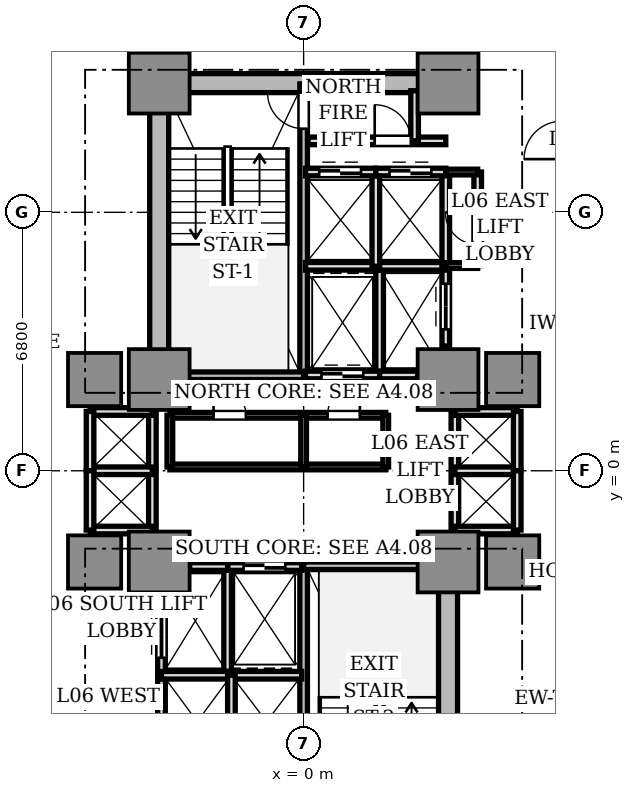
"""IFC4 building model, lengths in metres.
Left out: names, types, materials, properties, quantities, classifications, styles, units other than length and angle.
Written with IfcOpenShell. Run it as: python <this file> out.ifc"""

import sys

from ifc_helpers import new_model, si_unit, direction, frame, frame_2d, origin, origin_2d, place, context, subcontext, project, spatial, rectangle, extrude, source, transform, mapped, element, fill, save


model = new_model("IFC4")
c1 = context("Model", 3, precision=1e-05, world=origin(), true_north=direction((0.0, 1.0)))
c2 = subcontext(c1, "Body", "Model", "MODEL_VIEW")
j1 = project(units=[si_unit("LENGTHUNIT", "METRE"), si_unit("PLANEANGLEUNIT", "RADIAN")], contexts=[c1])
p1 = place(None, origin())
s1 = spatial("IfcSite", under=j1, at=p1, CompositionType="ELEMENT")
p2 = place(p1, origin())
s2 = spatial("IfcBuilding", under=s1, at=p2, CompositionType="ELEMENT")
p3 = place(p2, frame((0.0, 0.0, 26.45)))
s3 = spatial("IfcBuildingStorey", under=s2, at=p3, CompositionType="ELEMENT", Elevation=26.45)
p4 = place(p3, frame((-3.55, 10.2, 0.0), z_axis=(0.0, 0.0, 1.0), x_axis=(1.0, 0.0, 0.0)))
e1 = element("IfcWall", 1, at=p4, inside=s3, PredefinedType="SHEAR", context=c2, shape_type="SweptSolid", body=[
    extrude(rectangle(XDim=7.1, YDim=0.5, at=frame_2d((3.55, 0.0))), origin(), (0.0, 0.0, 1.0), 3.11),
])
for number, where, z_axis, x_axis in (
    (2, (-3.8, 2.85, 0.0), (0.0, 0.0, 1.0), (0.0, 1.0, 0.0)),
    (3, (3.8, -9.75, 0.0), (0.0, 0.0, 1.0), (0.0, 1.0, 0.0)),
):
    element("IfcWall", number, at=place(p3, frame(where, z_axis=z_axis, x_axis=x_axis)), inside=s3, PredefinedType="SHEAR", context=c2, shape_type="SweptSolid", body=[
        extrude(rectangle(XDim=6.9, YDim=0.5, at=frame_2d((3.45, 0.0))), origin(), (0.0, 0.0, 1.0), 3.11),
    ])
m1 = source(origin(), c2, "Body", "SweptSolid", [
    extrude(rectangle(XDim=1.6, YDim=1.6, at=origin_2d()), origin(), (0.0, 0.0, 1.0), 3.11),
])
for number, where, z_axis, x_axis in (
    (4, (-3.8, 2.4, 0.0), (0.0, 0.0, 1.0), (1.0, 0.0, 0.0)),
    (5, (3.8, 2.4, 0.0), (0.0, 0.0, 1.0), (1.0, 0.0, 0.0)),
    (6, (-3.8, 10.2, 0.0), (0.0, 0.0, 1.0), (1.0, 0.0, 0.0)),
    (7, (3.8, 10.2, 0.0), (0.0, 0.0, 1.0), (1.0, 0.0, 0.0)),
    (8, (-3.8, -2.4, 0.0), (0.0, 0.0, 1.0), (1.0, 0.0, 0.0)),
    (9, (3.8, -2.4, 0.0), (0.0, 0.0, 1.0), (1.0, 0.0, 0.0)),
):
    element("IfcColumn", number, at=place(p3, frame(where, z_axis=z_axis, x_axis=x_axis)), inside=s3, PredefinedType="COLUMN", context=c2, shape_type="MappedRepresentation", body=[
        mapped(m1, transform((0.0, 0.0, 0.0), scale=1.0)),
    ])
m2 = source(origin(), c2, "Body", "SweptSolid", [
    extrude(rectangle(XDim=1.4, YDim=1.4, at=origin_2d()), origin(), (0.0, 0.0, 1.0), 3.11),
])
for number, where, z_axis, x_axis in (
    (10, (5.5, 2.4, 0.0), (0.0, 0.0, 1.0), (1.0, 0.0, 0.0)),
    (11, (-5.5, 2.4, 0.0), (0.0, 0.0, 1.0), (1.0, 0.0, 0.0)),
    (12, (5.5, -2.4, 0.0), (0.0, 0.0, 1.0), (1.0, 0.0, 0.0)),
    (13, (-5.5, -2.4, 0.0), (0.0, 0.0, 1.0), (1.0, 0.0, 0.0)),
):
    element("IfcColumn", number, at=place(p3, frame(where, z_axis=z_axis, x_axis=x_axis)), inside=s3, PredefinedType="COLUMN", context=c2, shape_type="MappedRepresentation", body=[
        mapped(m2, transform((0.0, 0.0, 0.0), scale=1.0)),
    ])
p5 = place(p3, frame((0.0, 2.5, 0.0), z_axis=(0.0, 0.0, 1.0), x_axis=(0.0, 1.0, 0.0)))
e14 = element("IfcWall", 14, at=p5, inside=s3, PredefinedType="SOLIDWALL", context=c2, shape_type="SweptSolid", body=[
    extrude(rectangle(XDim=7.68, YDim=0.2, at=frame_2d((3.84, 0.0))), origin(), (0.0, 0.0, 1.0), 3.11),
])
p6 = place(p5, frame((6.5, 0.0, 0.0)))
e15 = element("IfcOpeningElement", 15, at=p6, cuts=e14, PredefinedType="OPENING", context=c2, shape_type="SweptSolid", body=[
    extrude(rectangle(XDim=0.95, YDim=2.15, at=frame_2d((0.475, 1.075))), frame((0.0, 0.11, 0.0), z_axis=(0.0, -1.0, 0.0), x_axis=(1.0, 0.0, 0.0)), (0.0, 0.0, 1.0), 0.22),
])
p7 = place(p3, frame((-3.72, 2.5, 0.0), z_axis=(0.0, 0.0, 1.0), x_axis=(1.0, 0.0, 0.0)))
e16 = element("IfcWall", 16, at=p7, inside=s3, PredefinedType="SOLIDWALL", context=c2, shape_type="SweptSolid", body=[
    extrude(rectangle(XDim=3.72, YDim=0.2, at=frame_2d((1.86, 0.0))), origin(), (0.0, 0.0, 1.0), 3.11),
])
p8 = place(p3, frame((0.0, -10.18, 0.0), z_axis=(0.0, 0.0, 1.0), x_axis=(0.0, 1.0, 0.0)))
e17 = element("IfcWall", 17, at=p8, inside=s3, PredefinedType="SOLIDWALL", context=c2, shape_type="SweptSolid", body=[
    extrude(rectangle(XDim=7.68, YDim=0.2, at=frame_2d((3.84, 0.0))), origin(), (0.0, 0.0, 1.0), 3.11),
])
p9 = place(p8, frame((0.28, 0.0, 0.0)))
e18 = element("IfcOpeningElement", 18, at=p9, cuts=e17, PredefinedType="OPENING", context=c2, shape_type="SweptSolid", body=[
    extrude(rectangle(XDim=1.1, YDim=2.15, at=frame_2d((0.55, 1.075))), frame((0.0, 0.11, 0.0), z_axis=(0.0, -1.0, 0.0), x_axis=(1.0, 0.0, 0.0)), (0.0, 0.0, 1.0), 0.22),
])
p10 = place(p3, frame((0.0, -2.5, 0.0), z_axis=(0.0, 0.0, 1.0), x_axis=(1.0, 0.0, 0.0)))
e19 = element("IfcWall", 19, at=p10, inside=s3, PredefinedType="SOLIDWALL", context=c2, shape_type="SweptSolid", body=[
    extrude(rectangle(XDim=3.72, YDim=0.2, at=frame_2d((1.86, 0.0))), origin(), (0.0, 0.0, 1.0), 3.11),
])
p11 = place(p3, frame((2.0, 2.5, 0.0), z_axis=(0.0, 0.0, 1.0), x_axis=(0.0, 1.0, 0.0)))
e20 = element("IfcWall", 20, at=p11, inside=s3, PredefinedType="SOLIDWALL", context=c2, shape_type="SweptSolid", body=[
    extrude(rectangle(XDim=2.78, YDim=0.2, at=frame_2d((1.39, 0.0))), origin(), (0.0, 0.0, 1.0), 2.66),
])
p12 = place(p3, frame((0.05, 2.52, 0.0), z_axis=(0.0, 0.0, 1.0), x_axis=(1.0, 0.0, 0.0)))
e21 = element("IfcWall", 21, at=p12, inside=s3, PredefinedType="SOLIDWALL", context=c2, shape_type="SweptSolid", body=[
    extrude(rectangle(XDim=1.95, YDim=0.2, at=frame_2d((0.975, 0.0))), origin(), (0.0, 0.0, 1.0), 2.66),
])
p13 = place(p12, frame((0.42, 0.0, 0.0)))
e22 = element("IfcOpeningElement", 22, at=p13, cuts=e21, PredefinedType="OPENING", context=c2, shape_type="SweptSolid", body=[
    extrude(rectangle(XDim=1.1, YDim=2.2, at=frame_2d((0.55, 1.1))), frame((0.0, 0.11, 0.0), z_axis=(0.0, -1.0, 0.0), x_axis=(1.0, 0.0, 0.0)), (0.0, 0.0, 1.0), 0.22),
])
p14 = place(p3, frame((-2.0, -5.28, 0.0), z_axis=(0.0, 0.0, 1.0), x_axis=(0.0, 1.0, 0.0)))
e23 = element("IfcWall", 23, at=p14, inside=s3, PredefinedType="SOLIDWALL", context=c2, shape_type="SweptSolid", body=[
    extrude(rectangle(XDim=2.78, YDim=0.2, at=frame_2d((1.39, 0.0))), origin(), (0.0, 0.0, 1.0), 2.66),
])
p15 = place(p3, frame((-2.0, -2.52, 0.0), z_axis=(0.0, 0.0, 1.0), x_axis=(1.0, 0.0, 0.0)))
e24 = element("IfcWall", 24, at=p15, inside=s3, PredefinedType="SOLIDWALL", context=c2, shape_type="SweptSolid", body=[
    extrude(rectangle(XDim=1.95, YDim=0.2, at=frame_2d((0.975, 0.0))), origin(), (0.0, 0.0, 1.0), 2.66),
])
p16 = place(p15, frame((0.42, 0.0, 0.0)))
e25 = element("IfcOpeningElement", 25, at=p16, cuts=e24, PredefinedType="OPENING", context=c2, shape_type="SweptSolid", body=[
    extrude(rectangle(XDim=1.1, YDim=2.2, at=frame_2d((0.55, 1.1))), frame((0.0, 0.11, 0.0), z_axis=(0.0, -1.0, 0.0), x_axis=(1.0, 0.0, 0.0)), (0.0, 0.0, 1.0), 0.22),
])
p17 = place(p3, frame((2.0, 2.52, 0.0), z_axis=(0.0, 0.0, 1.0), x_axis=(1.0, 0.0, 0.0)))
e26 = element("IfcWall", 26, at=p17, inside=s3, PredefinedType="SOLIDWALL", context=c2, shape_type="SweptSolid", body=[
    extrude(rectangle(XDim=1.0, YDim=0.2, at=frame_2d((0.5, 0.0))), origin(), (0.0, 0.0, 1.0), 2.66),
])
p18 = place(p3, frame((3.74, 3.28, 0.0), z_axis=(0.0, 0.0, 1.0), x_axis=(0.0, 1.0, 0.0)))
e27 = element("IfcWall", 27, at=p18, inside=s3, PredefinedType="SOLIDWALL", context=c2, shape_type="SweptSolid", body=[
    extrude(rectangle(XDim=2.08, YDim=0.2, at=frame_2d((1.04, 0.0))), origin(), (0.0, 0.0, 1.0), 2.66),
])
p19 = place(p18, frame((0.44, 0.0, 0.0)))
e28 = element("IfcOpeningElement", 28, at=p19, cuts=e27, PredefinedType="OPENING", context=c2, shape_type="SweptSolid", body=[
    extrude(rectangle(XDim=1.2, YDim=2.2, at=frame_2d((0.6, 1.1))), frame((0.0, 0.11, 0.0), z_axis=(0.0, -1.0, 0.0), x_axis=(1.0, 0.0, 0.0)), (0.0, 0.0, 1.0), 0.22),
])
p20 = place(p3, frame((-3.0, -2.52, 0.0), z_axis=(0.0, 0.0, 1.0), x_axis=(1.0, 0.0, 0.0)))
e29 = element("IfcWall", 29, at=p20, inside=s3, PredefinedType="SOLIDWALL", context=c2, shape_type="SweptSolid", body=[
    extrude(rectangle(XDim=1.0, YDim=0.2, at=frame_2d((0.5, 0.0))), origin(), (0.0, 0.0, 1.0), 2.66),
])
p21 = place(p3, frame((-3.74, -5.36, 0.0), z_axis=(0.0, 0.0, 1.0), x_axis=(0.0, 1.0, 0.0)))
e30 = element("IfcWall", 30, at=p21, inside=s3, PredefinedType="SOLIDWALL", context=c2, shape_type="SweptSolid", body=[
    extrude(rectangle(XDim=2.08, YDim=0.2, at=frame_2d((1.04, 0.0))), origin(), (0.0, 0.0, 1.0), 2.66),
])
p22 = place(p21, frame((0.44, 0.0, 0.0)))
e31 = element("IfcOpeningElement", 31, at=p22, cuts=e30, PredefinedType="OPENING", context=c2, shape_type="SweptSolid", body=[
    extrude(rectangle(XDim=1.2, YDim=2.2, at=frame_2d((0.6, 1.1))), frame((0.0, 0.11, 0.0), z_axis=(0.0, -1.0, 0.0), x_axis=(1.0, 0.0, 0.0)), (0.0, 0.0, 1.0), 0.22),
])
p23 = place(p3, frame((0.05, 5.38, 0.0), z_axis=(0.0, 0.0, 1.0), x_axis=(1.0, 0.0, 0.0)))
e32 = element("IfcWall", 32, at=p23, inside=s3, PredefinedType="SOLIDWALL", context=c2, shape_type="SweptSolid", body=[
    extrude(rectangle(XDim=3.69, YDim=0.2, at=frame_2d((1.845, 0.0))), origin(), (0.0, 0.0, 1.0), 2.66),
])
p24 = place(p3, frame((1.9, 5.38, 0.0), z_axis=(0.0, 0.0, 1.0), x_axis=(0.0, 1.0, 0.0)))
e33 = element("IfcWall", 33, at=p24, inside=s3, PredefinedType="SOLIDWALL", context=c2, shape_type="SweptSolid", body=[
    extrude(rectangle(XDim=2.48, YDim=0.2, at=frame_2d((1.24, 0.0))), origin(), (0.0, 0.0, 1.0), 2.66),
])
p25 = place(p3, frame((0.05, 7.86, 0.0), z_axis=(0.0, 0.0, 1.0), x_axis=(1.0, 0.0, 0.0)))
e34 = element("IfcWall", 34, at=p25, inside=s3, PredefinedType="SOLIDWALL", context=c2, shape_type="SweptSolid", body=[
    extrude(rectangle(XDim=1.85, YDim=0.2, at=frame_2d((0.925, 0.0))), origin(), (0.0, 0.0, 1.0), 2.66),
])
p26 = place(p25, frame((0.36, 0.0, 0.0)))
e35 = element("IfcOpeningElement", 35, at=p26, cuts=e34, PredefinedType="OPENING", context=c2, shape_type="SweptSolid", body=[
    extrude(rectangle(XDim=1.1, YDim=2.2, at=frame_2d((0.55, 1.1))), frame((0.0, 0.11, 0.0), z_axis=(0.0, -1.0, 0.0), x_axis=(1.0, 0.0, 0.0)), (0.0, 0.0, 1.0), 0.22),
])
p27 = place(p3, frame((3.74, 5.38, 0.0), z_axis=(0.0, 0.0, 1.0), x_axis=(0.0, 1.0, 0.0)))
e36 = element("IfcWall", 36, at=p27, inside=s3, PredefinedType="SOLIDWALL", context=c2, shape_type="SweptSolid", body=[
    extrude(rectangle(XDim=2.48, YDim=0.2, at=frame_2d((1.24, 0.0))), origin(), (0.0, 0.0, 1.0), 2.66),
])
p28 = place(p3, frame((1.9, 7.86, 0.0), z_axis=(0.0, 0.0, 1.0), x_axis=(1.0, 0.0, 0.0)))
e37 = element("IfcWall", 37, at=p28, inside=s3, PredefinedType="SOLIDWALL", context=c2, shape_type="SweptSolid", body=[
    extrude(rectangle(XDim=1.84, YDim=0.2, at=frame_2d((0.92, 0.0))), origin(), (0.0, 0.0, 1.0), 2.66),
])
p29 = place(p28, frame((0.36, 0.0, 0.0)))
e38 = element("IfcOpeningElement", 38, at=p29, cuts=e37, PredefinedType="OPENING", context=c2, shape_type="SweptSolid", body=[
    extrude(rectangle(XDim=1.1, YDim=2.2, at=frame_2d((0.55, 1.1))), frame((0.0, 0.11, 0.0), z_axis=(0.0, -1.0, 0.0), x_axis=(1.0, 0.0, 0.0)), (0.0, 0.0, 1.0), 0.22),
])
p30 = place(p3, frame((-3.74, -7.86, 0.0), z_axis=(0.0, 0.0, 1.0), x_axis=(0.0, 1.0, 0.0)))
e39 = element("IfcWall", 39, at=p30, inside=s3, PredefinedType="SOLIDWALL", context=c2, shape_type="SweptSolid", body=[
    extrude(rectangle(XDim=2.48, YDim=0.2, at=frame_2d((1.24, 0.0))), origin(), (0.0, 0.0, 1.0), 2.66),
])
p31 = place(p3, frame((-3.74, -5.38, 0.0), z_axis=(0.0, 0.0, 1.0), x_axis=(1.0, 0.0, 0.0)))
e40 = element("IfcWall", 40, at=p31, inside=s3, PredefinedType="SOLIDWALL", context=c2, shape_type="SweptSolid", body=[
    extrude(rectangle(XDim=3.69, YDim=0.2, at=frame_2d((1.845, 0.0))), origin(), (0.0, 0.0, 1.0), 2.66),
])
p32 = place(p3, frame((-1.9, -7.86, 0.0), z_axis=(0.0, 0.0, 1.0), x_axis=(0.0, 1.0, 0.0)))
e41 = element("IfcWall", 41, at=p32, inside=s3, PredefinedType="SOLIDWALL", context=c2, shape_type="SweptSolid", body=[
    extrude(rectangle(XDim=2.48, YDim=0.2, at=frame_2d((1.24, 0.0))), origin(), (0.0, 0.0, 1.0), 2.66),
])
p33 = place(p3, frame((3.98, -1.56, 0.0), z_axis=(0.0, 0.0, 1.0), x_axis=(0.0, 1.0, 0.0)))
e42 = element("IfcWall", 42, at=p33, inside=s3, PredefinedType="SOLIDWALL", context=c2, shape_type="SweptSolid", body=[
    extrude(rectangle(XDim=3.12, YDim=0.2, at=frame_2d((1.56, 0.0))), origin(), (0.0, 0.0, 1.0), 2.18),
])
for number, where, z_axis, x_axis in (
    (43, (3.98, 1.56, 0.0), (0.0, 0.0, 1.0), (1.0, 0.0, 0.0)),
    (44, (3.98, -1.56, 0.0), (0.0, 0.0, 1.0), (1.0, 0.0, 0.0)),
    (45, (3.98, 0.0, 0.0), (0.0, 0.0, 1.0), (1.0, 0.0, 0.0)),
):
    element("IfcWall", number, at=place(p3, frame(where, z_axis=z_axis, x_axis=x_axis)), inside=s3, PredefinedType="SOLIDWALL", context=c2, shape_type="SweptSolid", body=[
        extrude(rectangle(XDim=1.64, YDim=0.2, at=frame_2d((0.82, 0.0))), origin(), (0.0, 0.0, 1.0), 2.66),
    ])
for number, where, z_axis, x_axis in (
    (46, (5.62, 0.0, 0.0), (0.0, 0.0, 1.0), (0.0, 1.0, 0.0)),
    (47, (5.62, -1.56, 0.0), (0.0, 0.0, 1.0), (0.0, 1.0, 0.0)),
):
    element("IfcWall", number, at=place(p3, frame(where, z_axis=z_axis, x_axis=x_axis)), inside=s3, PredefinedType="SOLIDWALL", context=c2, shape_type="SweptSolid", body=[
        extrude(rectangle(XDim=1.56, YDim=0.2, at=frame_2d((0.78, 0.0))), origin(), (0.0, 0.0, 1.0), 2.66),
    ])
p34 = place(p3, frame((-3.98, -1.56, 0.0), z_axis=(0.0, 0.0, 1.0), x_axis=(0.0, 1.0, 0.0)))
e48 = element("IfcWall", 48, at=p34, inside=s3, PredefinedType="SOLIDWALL", context=c2, shape_type="SweptSolid", body=[
    extrude(rectangle(XDim=3.12, YDim=0.2, at=frame_2d((1.56, 0.0))), origin(), (0.0, 0.0, 1.0), 2.18),
])
for number, where, z_axis, x_axis in (
    (49, (-5.62, 1.56, 0.0), (0.0, 0.0, 1.0), (1.0, 0.0, 0.0)),
    (50, (-5.62, -1.56, 0.0), (0.0, 0.0, 1.0), (1.0, 0.0, 0.0)),
    (51, (-5.62, 0.0, 0.0), (0.0, 0.0, 1.0), (1.0, 0.0, 0.0)),
):
    element("IfcWall", number, at=place(p3, frame(where, z_axis=z_axis, x_axis=x_axis)), inside=s3, PredefinedType="SOLIDWALL", context=c2, shape_type="SweptSolid", body=[
        extrude(rectangle(XDim=1.64, YDim=0.2, at=frame_2d((0.82, 0.0))), origin(), (0.0, 0.0, 1.0), 2.66),
    ])
for number, where, z_axis, x_axis in (
    (52, (-5.62, 0.0, 0.0), (0.0, 0.0, 1.0), (0.0, 1.0, 0.0)),
    (53, (-5.62, -1.56, 0.0), (0.0, 0.0, 1.0), (0.0, 1.0, 0.0)),
):
    element("IfcWall", number, at=place(p3, frame(where, z_axis=z_axis, x_axis=x_axis)), inside=s3, PredefinedType="SOLIDWALL", context=c2, shape_type="SweptSolid", body=[
        extrude(rectangle(XDim=1.56, YDim=0.2, at=frame_2d((0.78, 0.0))), origin(), (0.0, 0.0, 1.0), 2.66),
    ])
p35 = place(p3, frame((0.12, 8.68, 0.0), z_axis=(0.0, 0.0, 1.0), x_axis=(1.0, 0.0, 0.0)))
e54 = element("IfcWall", 54, at=p35, inside=s3, PredefinedType="SOLIDWALL", context=c2, shape_type="SweptSolid", body=[
    extrude(rectangle(XDim=3.62, YDim=0.2, at=frame_2d((1.81, 0.0))), origin(), (0.0, 0.0, 1.0), 2.66),
])
p36 = place(p35, frame((1.75, 0.0, 0.0)))
e55 = element("IfcOpeningElement", 55, at=p36, cuts=e54, PredefinedType="OPENING", context=c2, shape_type="SweptSolid", body=[
    extrude(rectangle(XDim=0.95, YDim=2.15, at=frame_2d((0.475, 1.075))), frame((0.0, 0.11, 0.0), z_axis=(0.0, -1.0, 0.0), x_axis=(1.0, 0.0, 0.0)), (0.0, 0.0, 1.0), 0.22),
])
p37 = place(p3, frame((2.92, 8.68, 0.0), z_axis=(0.0, 0.0, 1.0), x_axis=(0.0, 1.0, 0.0)))
e56 = element("IfcWall", 56, at=p37, inside=s3, PredefinedType="SOLIDWALL", context=c2, shape_type="SweptSolid", body=[
    extrude(rectangle(XDim=1.32, YDim=0.2, at=frame_2d((0.66, 0.0))), origin(), (0.0, 0.0, 1.0), 2.66),
])
p38 = place(p3, frame((4.58, 5.4, 0.0), z_axis=(0.0, 0.0, 1.0), x_axis=(0.0, 1.0, 0.0)))
e57 = element("IfcWall", 57, at=p38, inside=s3, PredefinedType="SOLIDWALL", context=c2, shape_type="SweptSolid", body=[
    extrude(rectangle(XDim=2.46, YDim=0.2, at=frame_2d((1.23, 0.0))), origin(), (0.0, 0.0, 1.0), 2.66),
])
p39 = place(p38, frame((0.55, 0.0, 0.0)))
e58 = element("IfcOpeningElement", 58, at=p39, cuts=e57, PredefinedType="OPENING", context=c2, shape_type="SweptSolid", body=[
    extrude(rectangle(XDim=0.85, YDim=2.1, at=frame_2d((0.425, 1.05))), frame((0.0, 0.11, 0.0), z_axis=(0.0, -1.0, 0.0), x_axis=(1.0, 0.0, 0.0)), (0.0, 0.0, 1.0), 0.22),
])
for number, where, z_axis, x_axis in (
    (59, (3.74, 5.4, 0.0), (0.0, 0.0, 1.0), (1.0, 0.0, 0.0)),
    (60, (3.74, 7.86, 0.0), (0.0, 0.0, 1.0), (1.0, 0.0, 0.0)),
):
    element("IfcWall", number, at=place(p3, frame(where, z_axis=z_axis, x_axis=x_axis)), inside=s3, PredefinedType="PARTITIONING", context=c2, shape_type="SweptSolid", body=[
        extrude(rectangle(XDim=0.84, YDim=0.15, at=frame_2d((0.42, 0.0))), origin(), (0.0, 0.0, 1.0), 2.66),
    ])
p40 = place(p3, frame((-3.52, 0.1, 0.0), z_axis=(0.0, 0.0, 1.0), x_axis=(1.0, 0.0, 0.0)))
e61 = element("IfcWall", 61, at=p40, inside=s3, PredefinedType="PARTITIONING", context=c2, shape_type="SweptSolid", body=[
    extrude(rectangle(XDim=5.68, YDim=0.15, at=frame_2d((2.84, 0.0))), origin(), (0.0, 0.0, 1.0), 2.66),
])
p41 = place(p3, frame((-3.52, 1.46, 0.0), z_axis=(0.0, 0.0, 1.0), x_axis=(1.0, 0.0, 0.0)))
e62 = element("IfcWall", 62, at=p41, inside=s3, PredefinedType="PARTITIONING", context=c2, shape_type="SweptSolid", body=[
    extrude(rectangle(XDim=5.68, YDim=0.15, at=frame_2d((2.84, 0.0))), origin(), (0.0, 0.0, 1.0), 2.66),
])
p42 = place(p41, frame((1.15, 0.0, 0.0)))
e63 = element("IfcOpeningElement", 63, at=p42, cuts=e62, PredefinedType="OPENING", context=c2, shape_type="SweptSolid", body=[
    extrude(rectangle(XDim=0.85, YDim=2.1, at=frame_2d((0.425, 1.05))), frame((0.0, 0.085, 0.0), z_axis=(0.0, -1.0, 0.0), x_axis=(1.0, 0.0, 0.0)), (0.0, 0.0, 1.0), 0.17),
])
p43 = place(p41, frame((4.15, 0.0, 0.0)))
e64 = element("IfcOpeningElement", 64, at=p43, cuts=e62, PredefinedType="OPENING", context=c2, shape_type="SweptSolid", body=[
    extrude(rectangle(XDim=0.85, YDim=2.1, at=frame_2d((0.425, 1.05))), frame((0.0, 0.085, 0.0), z_axis=(0.0, -1.0, 0.0), x_axis=(1.0, 0.0, 0.0)), (0.0, 0.0, 1.0), 0.17),
])
p44 = place(p3, frame((-3.52, 0.1, 0.0), z_axis=(0.0, 0.0, 1.0), x_axis=(0.0, 1.0, 0.0)))
e65 = element("IfcWall", 65, at=p44, inside=s3, PredefinedType="PARTITIONING", context=c2, shape_type="SweptSolid", body=[
    extrude(rectangle(XDim=1.36, YDim=0.15, at=frame_2d((0.68, 0.0))), origin(), (0.0, 0.0, 1.0), 2.18),
])
for number, where, z_axis, x_axis in (
    (66, (2.16, 0.1, 0.0), (0.0, 0.0, 1.0), (0.0, 1.0, 0.0)),
    (67, (0.0, 0.1, 0.0), (0.0, 0.0, 1.0), (0.0, 1.0, 0.0)),
):
    element("IfcWall", number, at=place(p3, frame(where, z_axis=z_axis, x_axis=x_axis)), inside=s3, PredefinedType="PARTITIONING", context=c2, shape_type="SweptSolid", body=[
        extrude(rectangle(XDim=1.36, YDim=0.15, at=frame_2d((0.68, 0.0))), origin(), (0.0, 0.0, 1.0), 2.66),
    ])
m3 = source(origin(), c2, "Body", "SweptSolid", [
    extrude(rectangle(XDim=1.1, YDim=0.05, at=origin_2d()), origin(), (0.0, 0.0, 1.0), 2.2),
])
p45 = place(p13, frame((0.55, 0.0, 0.0)))
e68 = element("IfcDoor", 68, at=p45, inside=s3, OperationType="DOUBLE_DOOR_SLIDING", PredefinedType="DOOR", context=c2, shape_type="MappedRepresentation", body=[
    mapped(m3, transform((0.0, 0.0, 0.0), scale=1.0)),
])
fill(e22, e68)
p46 = place(p16, frame((0.55, 0.0, 0.0)))
e69 = element("IfcDoor", 69, at=p46, inside=s3, OperationType="DOUBLE_DOOR_SLIDING", PredefinedType="DOOR", context=c2, shape_type="MappedRepresentation", body=[
    mapped(m3, transform((0.0, 0.0, 0.0), scale=1.0)),
])
fill(e25, e69)
m4 = source(origin(), c2, "Body", "SweptSolid", [
    extrude(rectangle(XDim=1.2, YDim=0.05, at=origin_2d()), origin(), (0.0, 0.0, 1.0), 2.2),
])
p47 = place(p19, frame((0.6, 0.0, 0.0)))
e70 = element("IfcDoor", 70, at=p47, inside=s3, OperationType="DOUBLE_DOOR_SLIDING", PredefinedType="DOOR", context=c2, shape_type="MappedRepresentation", body=[
    mapped(m4, transform((0.0, 0.0, 0.0), scale=1.0)),
])
fill(e28, e70)
p48 = place(p22, frame((0.6, 0.0, 0.0)))
e71 = element("IfcDoor", 71, at=p48, inside=s3, OperationType="DOUBLE_DOOR_SLIDING", PredefinedType="DOOR", context=c2, shape_type="MappedRepresentation", body=[
    mapped(m4, transform((0.0, 0.0, 0.0), scale=1.0)),
])
fill(e31, e71)
p49 = place(p26, frame((0.55, 0.0, 0.0)))
e72 = element("IfcDoor", 72, at=p49, inside=s3, OperationType="DOUBLE_DOOR_SLIDING", PredefinedType="DOOR", context=c2, shape_type="MappedRepresentation", body=[
    mapped(m3, transform((0.0, 0.0, 0.0), scale=1.0)),
])
fill(e35, e72)
p50 = place(p29, frame((0.55, 0.0, 0.0)))
e73 = element("IfcDoor", 73, at=p50, inside=s3, OperationType="DOUBLE_DOOR_SLIDING", PredefinedType="DOOR", context=c2, shape_type="MappedRepresentation", body=[
    mapped(m3, transform((0.0, 0.0, 0.0), scale=1.0)),
])
fill(e38, e73)
m5 = source(origin(), c2, "Body", "SweptSolid", [
    extrude(rectangle(XDim=0.95, YDim=0.05, at=origin_2d()), origin(), (0.0, 0.0, 1.0), 2.15),
])
p51 = place(p6, frame((0.475, 0.0, 0.0)))
e74 = element("IfcDoor", 74, at=p51, inside=s3, OperationType="SINGLE_SWING_RIGHT", PredefinedType="DOOR", context=c2, shape_type="MappedRepresentation", body=[
    mapped(m5, transform((0.0, 0.0, 0.0), scale=1.0)),
])
fill(e15, e74)
p52 = place(p36, frame((0.475, 0.0, 0.0)))
e75 = element("IfcDoor", 75, at=p52, inside=s3, OperationType="SINGLE_SWING_LEFT", PredefinedType="DOOR", context=c2, shape_type="MappedRepresentation", body=[
    mapped(m5, transform((0.0, 0.0, 0.0), scale=1.0)),
])
fill(e55, e75)
m6 = source(origin(), c2, "Body", "SweptSolid", [
    extrude(rectangle(XDim=0.85, YDim=0.05, at=origin_2d()), origin(), (0.0, 0.0, 1.0), 2.1),
])
p53 = place(p39, frame((0.425, 0.0, 0.0)))
e76 = element("IfcDoor", 76, at=p53, inside=s3, OperationType="SINGLE_SWING_RIGHT", PredefinedType="DOOR", context=c2, shape_type="MappedRepresentation", body=[
    mapped(m6, transform((0.0, 0.0, 0.0), scale=1.0)),
])
fill(e58, e76)
p54 = place(p42, frame((0.425, 0.0, 0.0)))
e77 = element("IfcDoor", 77, at=p54, inside=s3, OperationType="SINGLE_SWING_LEFT", PredefinedType="DOOR", context=c2, shape_type="MappedRepresentation", body=[
    mapped(m6, transform((0.0, 0.0, 0.0), scale=1.0)),
])
fill(e63, e77)
p55 = place(p43, frame((0.425, 0.0, 0.0)))
e78 = element("IfcDoor", 78, at=p55, inside=s3, OperationType="SINGLE_SWING_RIGHT", PredefinedType="DOOR", context=c2, shape_type="MappedRepresentation", body=[
    mapped(m6, transform((0.0, 0.0, 0.0), scale=1.0)),
])
fill(e64, e78)
save(model, sys.argv[1])
